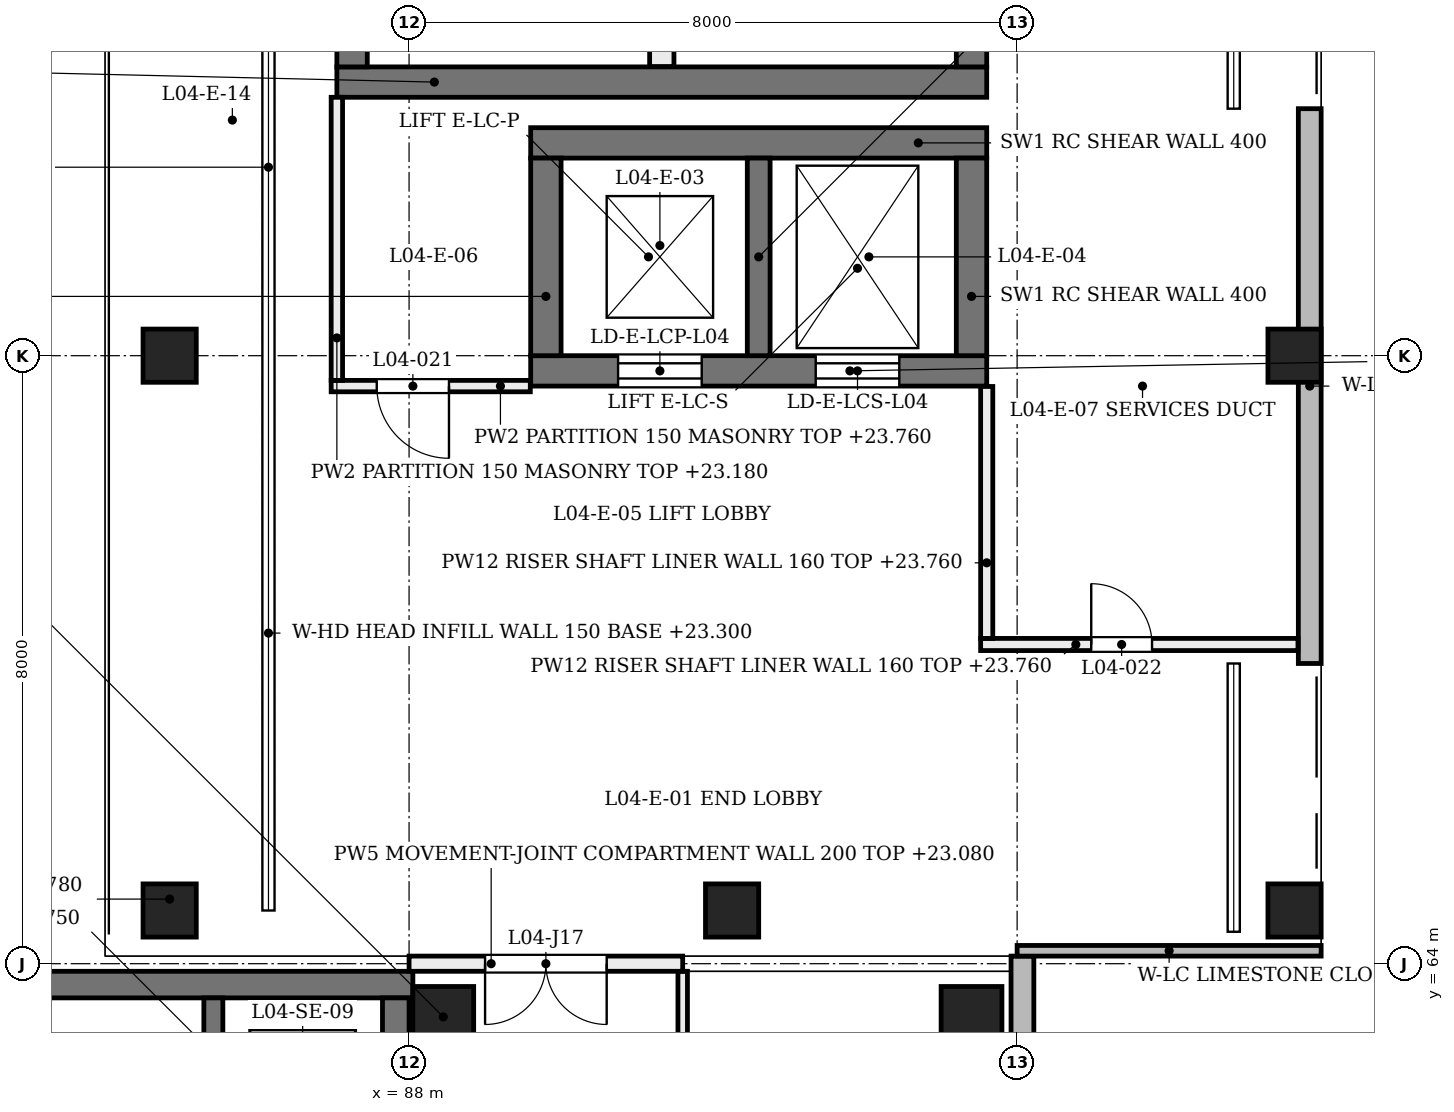
"""IFC4 building model, lengths in metres.
Left out: names, types, materials, properties, quantities, classifications, styles, units other than length and angle.
Written with IfcOpenShell. Run it as: python <this file> out.ifc"""

import sys

from ifc_helpers import new_model, si_unit, direction, frame, frame_2d, origin, origin_2d, place, context, subcontext, project, spatial, rectangle, extrude, element, fill, save


model = new_model("IFC4")
c1 = context("Model", 3, precision=1e-05, world=origin(), true_north=direction((0.0, 1.0)))
c2 = subcontext(c1, "Body", "Model", "MODEL_VIEW")
j1 = project(units=[si_unit("LENGTHUNIT", "METRE"), si_unit("PLANEANGLEUNIT", "RADIAN")], contexts=[c1])
p1 = place(None, origin())
s1 = spatial("IfcSite", under=j1, at=p1, CompositionType="ELEMENT")
p2 = place(p1, origin())
s2 = spatial("IfcBuilding", under=s1, at=p2, CompositionType="ELEMENT")
p3 = place(p2, frame((0.0, 0.0, 19.2)))
s3 = spatial("IfcBuildingStorey", under=s2, at=p3, CompositionType="ELEMENT", Elevation=19.2)
p4 = place(p3, frame((89.6, 71.8, 0.0), z_axis=(0.0, 0.0, 1.0), x_axis=(1.0, 0.0, 0.0)))
e1 = element("IfcWall", 1, at=p4, inside=s3, PredefinedType="SHEAR", context=c2, shape_type="SweptSolid", body=[
    extrude(rectangle(XDim=6.0, YDim=0.4, at=frame_2d((3.0, 0.0))), origin(), (0.0, 0.0, 1.0), 4.58),
])
p5 = place(p4, frame((1.15, 0.0, 0.0)))
e2 = element("IfcOpeningElement", 2, at=p5, cuts=e1, PredefinedType="OPENING", context=c2, shape_type="SweptSolid", body=[
    extrude(rectangle(XDim=1.1, YDim=2.1, at=frame_2d((0.55, 1.05))), frame((0.0, 0.21, 0.0), z_axis=(0.0, -1.0, 0.0), x_axis=(1.0, 0.0, 0.0)), (0.0, 0.0, 1.0), 0.42),
])
p6 = place(p4, frame((3.75, 0.0, 0.0)))
e3 = element("IfcOpeningElement", 3, at=p6, cuts=e1, PredefinedType="OPENING", context=c2, shape_type="SweptSolid", body=[
    extrude(rectangle(XDim=1.1, YDim=2.1, at=frame_2d((0.55, 1.05))), frame((0.0, 0.21, 0.0), z_axis=(0.0, -1.0, 0.0), x_axis=(1.0, 0.0, 0.0)), (0.0, 0.0, 1.0), 0.42),
])
p7 = place(p3, frame((89.6, 74.8, 0.0), z_axis=(0.0, 0.0, 1.0), x_axis=(1.0, 0.0, 0.0)))
e4 = element("IfcWall", 4, at=p7, inside=s3, PredefinedType="SHEAR", context=c2, shape_type="SweptSolid", body=[
    extrude(rectangle(XDim=6.0, YDim=0.4, at=frame_2d((3.0, 0.0))), origin(), (0.0, 0.0, 1.0), 4.58),
])
for number, where, z_axis, x_axis in (
    (5, (89.8, 72.0, 0.0), (0.0, 0.0, 1.0), (0.0, 1.0, 0.0)),
    (6, (95.4, 72.0, 0.0), (0.0, 0.0, 1.0), (0.0, 1.0, 0.0)),
):
    element("IfcWall", number, at=place(p3, frame(where, z_axis=z_axis, x_axis=x_axis)), inside=s3, PredefinedType="SHEAR", context=c2, shape_type="SweptSolid", body=[
        extrude(rectangle(XDim=2.6, YDim=0.4, at=frame_2d((1.3, 0.0))), origin(), (0.0, 0.0, 1.0), 4.58),
    ])
p8 = place(p3, frame((92.6, 72.0, 0.0), z_axis=(0.0, 0.0, 1.0), x_axis=(0.0, 1.0, 0.0)))
e7 = element("IfcWall", 7, at=p8, inside=s3, PredefinedType="SHEAR", context=c2, shape_type="SweptSolid", body=[
    extrude(rectangle(XDim=2.6, YDim=0.3, at=frame_2d((1.3, 0.0))), origin(), (0.0, 0.0, 1.0), 4.58),
])
p9 = place(p3, frame((87.05, 75.6, 0.0), z_axis=(0.0, 0.0, 1.0), x_axis=(1.0, 0.0, 0.0)))
e8 = element("IfcWall", 8, at=p9, inside=s3, PredefinedType="SHEAR", context=c2, shape_type="SweptSolid", body=[
    extrude(rectangle(XDim=8.55, YDim=0.4, at=frame_2d((4.275, 0.0))), origin(), (0.0, 0.0, 1.0), 4.58),
])
p10 = place(p3, frame((87.25, 75.8, 0.0), z_axis=(0.0, 0.0, 1.0), x_axis=(0.0, 1.0, 0.0)))
e9 = element("IfcWall", 9, at=p10, inside=s3, PredefinedType="SHEAR", context=c2, shape_type="SweptSolid", body=[
    extrude(rectangle(XDim=7.0, YDim=0.4, at=frame_2d((3.5, 0.0))), origin(), (0.0, 0.0, 1.0), 4.58),
])
p11 = place(p10, frame((3.0, 0.0, 0.0)))
e10 = element("IfcOpeningElement", 10, at=p11, cuts=e9, PredefinedType="OPENING", context=c2, shape_type="SweptSolid", body=[
    extrude(rectangle(XDim=1.2, YDim=2.4, at=frame_2d((0.6, 1.2))), frame((0.0, 0.21, 0.0), z_axis=(0.0, -1.0, 0.0), x_axis=(1.0, 0.0, 0.0)), (0.0, 0.0, 1.0), 0.42),
])
p12 = place(p3, frame((95.4, 75.8, 0.0), z_axis=(0.0, 0.0, 1.0), x_axis=(0.0, 1.0, 0.0)))
e11 = element("IfcWall", 11, at=p12, inside=s3, PredefinedType="SHEAR", context=c2, shape_type="SweptSolid", body=[
    extrude(rectangle(XDim=7.0, YDim=0.4, at=frame_2d((3.5, 0.0))), origin(), (0.0, 0.0, 1.0), 4.58),
])
p13 = place(p12, frame((3.027, 0.0, 0.0)))
e12 = element("IfcOpeningElement", 12, at=p13, cuts=e11, PredefinedType="OPENING", context=c2, shape_type="SweptSolid", body=[
    extrude(rectangle(XDim=1.15, YDim=2.1, at=frame_2d((0.575, 1.05))), frame((0.0, 0.21, 0.0), z_axis=(0.0, -1.0, 0.0), x_axis=(1.0, 0.0, 0.0)), (0.0, 0.0, 1.0), 0.42),
])
p14 = place(p3, frame((80.1, 63.725, 0.0), z_axis=(0.0, 0.0, 1.0), x_axis=(1.0, 0.0, 0.0)))
e13 = element("IfcWall", 13, at=p14, inside=s3, PredefinedType="SHEAR", context=c2, shape_type="SweptSolid", body=[
    extrude(rectangle(XDim=7.95, YDim=0.35, at=frame_2d((3.975, 0.0))), origin(), (0.0, 0.0, 1.0), 4.58),
])
p15 = place(p3, frame((87.825, 48.35, 0.0), z_axis=(0.0, 0.0, 1.0), x_axis=(0.0, 1.0, 0.0)))
e14 = element("IfcWall", 14, at=p15, inside=s3, PredefinedType="SHEAR", context=c2, shape_type="SweptSolid", body=[
    extrude(rectangle(XDim=15.2, YDim=0.35, at=frame_2d((7.6, 0.0))), origin(), (0.0, 0.0, 1.0), 4.58),
])
p16 = place(p15, frame((0.95, 0.0, 0.0)))
e15 = element("IfcOpeningElement", 15, at=p16, cuts=e14, PredefinedType="OPENING", context=c2, shape_type="SweptSolid", body=[
    extrude(rectangle(XDim=1.0, YDim=2.1, at=frame_2d((0.5, 1.05))), frame((0.0, 0.185, 0.0), z_axis=(0.0, -1.0, 0.0), x_axis=(1.0, 0.0, 0.0)), (0.0, 0.0, 1.0), 0.37),
])
p17 = place(p15, frame((10.6, 0.0, 0.0)))
e16 = element("IfcOpeningElement", 16, at=p17, cuts=e14, PredefinedType="OPENING", context=c2, shape_type="SweptSolid", body=[
    extrude(rectangle(XDim=1.4, YDim=2.1, at=frame_2d((0.7, 1.05))), frame((0.0, 0.185, 0.0), z_axis=(0.0, -1.0, 0.0), x_axis=(1.0, 0.0, 0.0)), (0.0, 0.0, 1.0), 0.37),
])
for number, where, z_axis, x_axis in (
    (17, (88.45, 63.3, 0.0), (0.0, 0.0, 1.0), (1.0, 0.0, 0.0)),
    (18, (95.4, 63.3, 0.0), (0.0, 0.0, 1.0), (1.0, 0.0, 0.0)),
):
    element("IfcColumn", number, at=place(p3, frame(where, z_axis=z_axis, x_axis=x_axis)), inside=s3, PredefinedType="COLUMN", context=c2, shape_type="SweptSolid", body=[
        extrude(rectangle(XDim=0.8, YDim=0.8, at=origin_2d()), origin(), (0.0, 0.0, 1.0), 4.8),
    ])
for number, where, z_axis, x_axis in (
    (19, (84.6, 64.7, 0.0), (0.204, 0.0, 0.979), (0.0, 1.0, 0.0)),
    (20, (84.6, 72.0, 0.0), (0.204, 0.0, 0.979), (0.0, 1.0, 0.0)),
    (21, (92.0, 64.7, 0.0), (0.204, 0.0, 0.979), (0.0, 1.0, 0.0)),
    (22, (99.4, 64.7, 0.0), (0.204, 0.0, 0.979), (0.0, 1.0, 0.0)),
    (23, (99.4, 72.0, 0.0), (0.204, 0.0, 0.979), (0.0, 1.0, 0.0)),
):
    element("IfcColumn", number, at=place(p3, frame(where, z_axis=z_axis, x_axis=x_axis)), inside=s3, PredefinedType="COLUMN", context=c2, shape_type="SweptSolid", body=[
        extrude(rectangle(XDim=0.7, YDim=0.7, at=origin_2d()), origin(), (0.0, 0.0, 1.0), 4.678),
    ])
p18 = place(p3, frame((99.85, 67.95, 0.0), z_axis=(0.0, 0.0, 1.0), x_axis=(0.0, 1.0, 0.0)))
e24 = element("IfcWall", 24, at=p18, inside=s3, PredefinedType="SOLIDWALL", context=c2, shape_type="SweptSolid", body=[
    extrude(rectangle(XDim=7.3, YDim=0.3, at=frame_2d((3.65, 0.0))), origin(), (0.0, 0.0, 1.0), 3.9),
])
p19 = place(p3, frame((86.15, 64.9, 4.1), z_axis=(0.0, 0.0, 1.0), x_axis=(0.0, 1.0, 0.0)))
e25 = element("IfcWall", 25, at=p19, inside=s3, PredefinedType="SOLIDWALL", context=c2, shape_type="SweptSolid", body=[
    extrude(rectangle(XDim=6.9, YDim=0.15, at=frame_2d((3.45, 0.0))), origin(), (0.0, 0.0, 1.0), 0.48),
])
p20 = place(p3, frame((86.15, 72.2, 4.1), z_axis=(0.0, 0.0, 1.0), x_axis=(0.0, 1.0, 0.0)))
e26 = element("IfcWall", 26, at=p20, inside=s3, PredefinedType="SOLIDWALL", context=c2, shape_type="SweptSolid", body=[
    extrude(rectangle(XDim=7.6, YDim=0.15, at=frame_2d((3.8, 0.0))), origin(), (0.0, 0.0, 1.0), 0.48),
])
p21 = place(p3, frame((96.07, 47.7, 0.0), z_axis=(0.0, 0.0, 1.0), x_axis=(0.0, 1.0, 0.0)))
e27 = element("IfcWall", 27, at=p21, inside=s3, PredefinedType="SOLIDWALL", context=c2, shape_type="SweptSolid", body=[
    extrude(rectangle(XDim=16.4, YDim=0.3, at=frame_2d((8.2, 0.0))), origin(), (0.0, 0.0, 1.0), 3.9),
])
p22 = place(p21, frame((0.9, 0.0, 0.75)))
e28 = element("IfcOpeningElement", 28, at=p22, cuts=e27, PredefinedType="OPENING", context=c2, shape_type="SweptSolid", body=[
    extrude(rectangle(XDim=0.9, YDim=3.1, at=frame_2d((0.45, 1.55))), frame((0.0, 0.16, 0.0), z_axis=(0.0, -1.0, 0.0), x_axis=(1.0, 0.0, 0.0)), (0.0, 0.0, 1.0), 0.32),
])
p23 = place(p21, frame((3.6, 0.0, 0.75)))
e29 = element("IfcOpeningElement", 29, at=p23, cuts=e27, PredefinedType="OPENING", context=c2, shape_type="SweptSolid", body=[
    extrude(rectangle(XDim=0.9, YDim=3.1, at=frame_2d((0.45, 1.55))), frame((0.0, 0.16, 0.0), z_axis=(0.0, -1.0, 0.0), x_axis=(1.0, 0.0, 0.0)), (0.0, 0.0, 1.0), 0.32),
])
p24 = place(p21, frame((6.3, 0.0, 0.75)))
e30 = element("IfcOpeningElement", 30, at=p24, cuts=e27, PredefinedType="OPENING", context=c2, shape_type="SweptSolid", body=[
    extrude(rectangle(XDim=0.9, YDim=3.1, at=frame_2d((0.45, 1.55))), frame((0.0, 0.16, 0.0), z_axis=(0.0, -1.0, 0.0), x_axis=(1.0, 0.0, 0.0)), (0.0, 0.0, 1.0), 0.32),
])
p25 = place(p21, frame((9.0, 0.0, 0.75)))
e31 = element("IfcOpeningElement", 31, at=p25, cuts=e27, PredefinedType="OPENING", context=c2, shape_type="SweptSolid", body=[
    extrude(rectangle(XDim=0.9, YDim=3.1, at=frame_2d((0.45, 1.55))), frame((0.0, 0.16, 0.0), z_axis=(0.0, -1.0, 0.0), x_axis=(1.0, 0.0, 0.0)), (0.0, 0.0, 1.0), 0.32),
])
p26 = place(p21, frame((11.7, 0.0, 0.75)))
e32 = element("IfcOpeningElement", 32, at=p26, cuts=e27, PredefinedType="OPENING", context=c2, shape_type="SweptSolid", body=[
    extrude(rectangle(XDim=0.9, YDim=3.1, at=frame_2d((0.45, 1.55))), frame((0.0, 0.16, 0.0), z_axis=(0.0, -1.0, 0.0), x_axis=(1.0, 0.0, 0.0)), (0.0, 0.0, 1.0), 0.32),
])
p27 = place(p21, frame((14.4, 0.0, 0.75)))
e33 = element("IfcOpeningElement", 33, at=p27, cuts=e27, PredefinedType="OPENING", context=c2, shape_type="SweptSolid", body=[
    extrude(rectangle(XDim=0.9, YDim=3.1, at=frame_2d((0.45, 1.55))), frame((0.0, 0.16, 0.0), z_axis=(0.0, -1.0, 0.0), x_axis=(1.0, 0.0, 0.0)), (0.0, 0.0, 1.0), 0.32),
])
p28 = place(p3, frame((96.0, 64.17, 0.0), z_axis=(0.0, 0.0, 1.0), x_axis=(1.0, 0.0, 0.0)))
e34 = element("IfcWall", 34, at=p28, inside=s3, PredefinedType="SOLIDWALL", context=c2, shape_type="SweptSolid", body=[
    extrude(rectangle(XDim=4.0, YDim=0.14, at=frame_2d((2.0, 0.0))), origin(), (0.0, 0.0, 1.0), 3.9),
])
p29 = place(p3, frame((85.425, 61.1, 0.0), z_axis=(0.0, 0.0, 1.0), x_axis=(0.0, 1.0, 0.0)))
e35 = element("IfcWall", 35, at=p29, inside=s3, PredefinedType="SOLIDWALL", context=c2, shape_type="SweptSolid", body=[
    extrude(rectangle(XDim=2.45, YDim=0.25, at=frame_2d((1.225, 0.0))), origin(), (0.0, 0.0, 1.0), 4.55),
])
p30 = place(p3, frame((95.52, 68.2, 0.0), z_axis=(0.0, 0.0, 1.0), x_axis=(1.0, 0.0, 0.0)))
e36 = element("IfcWall", 36, at=p30, inside=s3, PredefinedType="PARTITIONING", context=c2, shape_type="SweptSolid", body=[
    extrude(rectangle(XDim=4.175, YDim=0.16, at=frame_2d((2.087, 0.0))), origin(), (0.0, 0.0, 1.0), 4.56),
])
p31 = place(p30, frame((1.455, 0.0, 0.0)))
e37 = element("IfcOpeningElement", 37, at=p31, cuts=e36, PredefinedType="OPENING", context=c2, shape_type="SweptSolid", body=[
    extrude(rectangle(XDim=0.8, YDim=2.1, at=frame_2d((0.4, 1.05))), frame((0.0, 0.09, 0.0), z_axis=(0.0, -1.0, 0.0), x_axis=(1.0, 0.0, 0.0)), (0.0, 0.0, 1.0), 0.18),
])
p32 = place(p3, frame((86.975, 71.6, 0.0), z_axis=(0.0, 0.0, 1.0), x_axis=(1.0, 0.0, 0.0)))
e38 = element("IfcWall", 38, at=p32, inside=s3, PredefinedType="PARTITIONING", context=c2, shape_type="SweptSolid", body=[
    extrude(rectangle(XDim=2.62, YDim=0.15, at=frame_2d((1.31, 0.0))), origin(), (0.0, 0.0, 1.0), 4.56),
])
p33 = place(p32, frame((0.6, 0.0, 0.0)))
e39 = element("IfcOpeningElement", 39, at=p33, cuts=e38, PredefinedType="OPENING", context=c2, shape_type="SweptSolid", body=[
    extrude(rectangle(XDim=0.95, YDim=2.1, at=frame_2d((0.475, 1.05))), frame((0.0, 0.085, 0.0), z_axis=(0.0, -1.0, 0.0), x_axis=(1.0, 0.0, 0.0)), (0.0, 0.0, 1.0), 0.17),
])
p34 = place(p3, frame((95.6, 68.28, 0.0), z_axis=(0.0, 0.0, 1.0), x_axis=(0.0, 1.0, 0.0)))
e40 = element("IfcWall", 40, at=p34, inside=s3, PredefinedType="PARTITIONING", context=c2, shape_type="SweptSolid", body=[
    extrude(rectangle(XDim=3.315, YDim=0.16, at=frame_2d((1.657, 0.0))), origin(), (0.0, 0.0, 1.0), 4.56),
])
p35 = place(p3, frame((87.05, 71.675, 0.0), z_axis=(0.0, 0.0, 1.0), x_axis=(0.0, 1.0, 0.0)))
e41 = element("IfcWall", 41, at=p35, inside=s3, PredefinedType="PARTITIONING", context=c2, shape_type="SweptSolid", body=[
    extrude(rectangle(XDim=3.725, YDim=0.15, at=frame_2d((1.862, 0.0))), origin(), (0.0, 0.0, 1.0), 3.98),
])
p36 = place(p3, frame((91.325, 75.805, 0.0), z_axis=(0.0, 0.0, 1.0), x_axis=(0.0, 1.0, 0.0)))
e42 = element("IfcWall", 42, at=p36, inside=s3, PredefinedType="PARTITIONING", context=c2, shape_type="SweptSolid", body=[
    extrude(rectangle(XDim=6.99, YDim=0.32, at=frame_2d((3.495, 0.0))), origin(), (0.0, 0.0, 1.0), 3.98),
])
p37 = place(p36, frame((2.895, 0.0, 0.0)))
e43 = element("IfcOpeningElement", 43, at=p37, cuts=e42, PredefinedType="OPENING", context=c2, shape_type="SweptSolid", body=[
    extrude(rectangle(XDim=1.2, YDim=2.4, at=frame_2d((0.6, 1.2))), frame((0.0, 0.17, 0.0), z_axis=(0.0, -1.0, 0.0), x_axis=(1.0, 0.0, 0.0)), (0.0, 0.0, 1.0), 0.34),
])
p38 = place(p3, frame((91.6, 53.605, 0.0), z_axis=(0.0, 0.0, 1.0), x_axis=(0.0, 1.0, 0.0)))
e44 = element("IfcWall", 44, at=p38, inside=s3, PredefinedType="PARTITIONING", context=c2, shape_type="SweptSolid", body=[
    extrude(rectangle(XDim=10.295, YDim=0.125, at=frame_2d((5.147, 0.0))), origin(), (0.0, 0.0, 1.0), 3.88),
])
p39 = place(p38, frame((7.567, 0.0, 0.0)))
e45 = element("IfcOpeningElement", 45, at=p39, cuts=e44, PredefinedType="OPENING", context=c2, shape_type="SweptSolid", body=[
    extrude(rectangle(XDim=1.0, YDim=2.1, at=frame_2d((0.5, 1.05))), frame((0.0, 0.073, 0.0), z_axis=(0.0, -1.0, 0.0), x_axis=(1.0, 0.0, 0.0)), (0.0, 0.0, 1.0), 0.145),
])
p40 = place(p3, frame((88.0, 64.0, 0.0), z_axis=(0.0, 0.0, 1.0), x_axis=(1.0, 0.0, 0.0)))
e46 = element("IfcWall", 46, at=p40, inside=s3, PredefinedType="PARTITIONING", context=c2, shape_type="SweptSolid", body=[
    extrude(rectangle(XDim=3.6, YDim=0.2, at=frame_2d((1.8, 0.0))), origin(), (0.0, 0.0, 1.0), 3.88),
])
p41 = place(p40, frame((1.0, 0.0, 0.0)))
e47 = element("IfcOpeningElement", 47, at=p41, cuts=e46, PredefinedType="OPENING", context=c2, shape_type="SweptSolid", body=[
    extrude(rectangle(XDim=1.6, YDim=2.1, at=frame_2d((0.8, 1.05))), frame((0.0, 0.11, 0.0), z_axis=(0.0, -1.0, 0.0), x_axis=(1.0, 0.0, 0.0)), (0.0, 0.0, 1.0), 0.22),
])
p42 = place(p5, frame((1.1, 0.0, 0.0), z_axis=(0.0, 0.0, 1.0), x_axis=(-1.0, 0.0, 0.0)))
e48 = element("IfcDoor", 48, at=p42, inside=s3, OperationType="DOUBLE_DOOR_SLIDING", PredefinedType="DOOR", context=c2, shape_type="SweptSolid", body=[
    extrude(rectangle(XDim=1.1, YDim=2.1, at=frame_2d((0.55, 1.05))), frame((0.0, 0.025, 0.0), z_axis=(0.0, -1.0, 0.0), x_axis=(1.0, 0.0, 0.0)), (0.0, 0.0, 1.0), 0.05),
])
fill(e2, e48)
p43 = place(p6, frame((1.1, 0.0, 0.0), z_axis=(0.0, 0.0, 1.0), x_axis=(-1.0, 0.0, 0.0)))
e49 = element("IfcDoor", 49, at=p43, inside=s3, OperationType="DOUBLE_DOOR_SLIDING", PredefinedType="DOOR", context=c2, shape_type="SweptSolid", body=[
    extrude(rectangle(XDim=1.1, YDim=2.1, at=frame_2d((0.55, 1.05))), frame((0.0, 0.025, 0.0), z_axis=(0.0, -1.0, 0.0), x_axis=(1.0, 0.0, 0.0)), (0.0, 0.0, 1.0), 0.05),
])
fill(e3, e49)
p44 = place(p33, origin())
e50 = element("IfcDoor", 50, at=p44, inside=s3, OperationType="SINGLE_SWING_RIGHT", PredefinedType="DOOR", context=c2, shape_type="SweptSolid", body=[
    extrude(rectangle(XDim=0.95, YDim=2.1, at=frame_2d((0.475, 1.05))), frame((0.0, 0.025, 0.0), z_axis=(0.0, -1.0, 0.0), x_axis=(1.0, 0.0, 0.0)), (0.0, 0.0, 1.0), 0.05),
])
fill(e39, e50)
p45 = place(p31, origin())
e51 = element("IfcDoor", 51, at=p45, inside=s3, OperationType="SINGLE_SWING_LEFT", PredefinedType="DOOR", context=c2, shape_type="SweptSolid", body=[
    extrude(rectangle(XDim=0.8, YDim=2.1, at=frame_2d((0.4, 1.05))), frame((0.0, 0.025, 0.0), z_axis=(0.0, -1.0, 0.0), x_axis=(1.0, 0.0, 0.0)), (0.0, 0.0, 1.0), 0.05),
])
fill(e37, e51)
p46 = place(p41, frame((1.6, 0.0, 0.0), z_axis=(0.0, 0.0, 1.0), x_axis=(-1.0, 0.0, 0.0)))
e52 = element("IfcDoor", 52, at=p46, inside=s3, OperationType="DOUBLE_DOOR_SINGLE_SWING", PredefinedType="DOOR", context=c2, shape_type="SweptSolid", body=[
    extrude(rectangle(XDim=1.6, YDim=2.1, at=frame_2d((0.8, 1.05))), frame((0.0, 0.025, 0.0), z_axis=(0.0, -1.0, 0.0), x_axis=(1.0, 0.0, 0.0)), (0.0, 0.0, 1.0), 0.05),
])
fill(e47, e52)
save(model, sys.argv[1])
